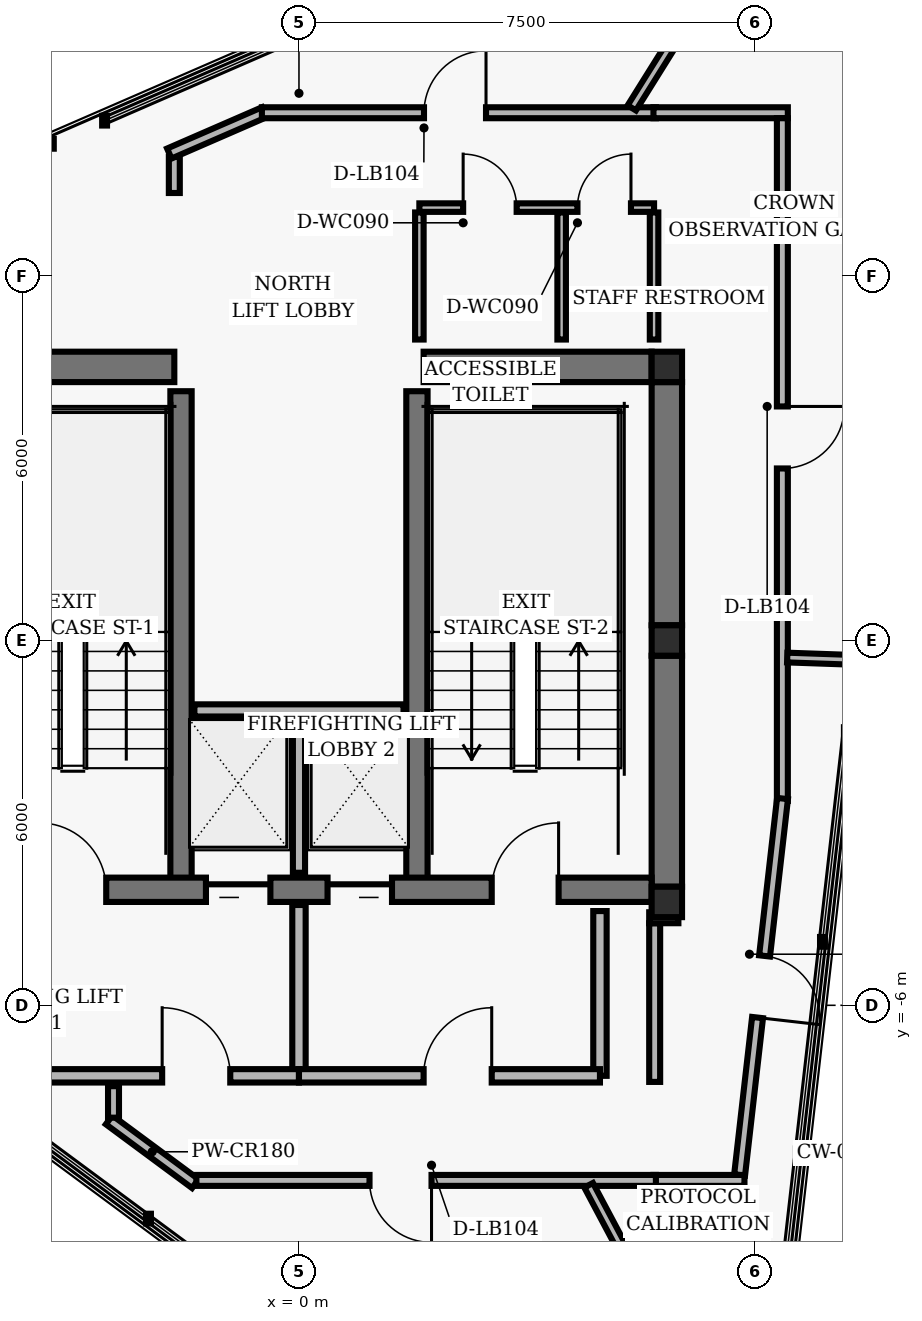
"""IFC4 building model, lengths in metres.
Left out: names, types, materials, properties, quantities, classifications, styles, units other than length and angle.
Written with IfcOpenShell. Run it as: python <this file> out.ifc"""

import sys

from ifc_helpers import new_model, si_unit, direction, frame, frame_2d, origin, origin_2d, place, context, subcontext, project, spatial, rectangle, hollow_rectangle, extrude, element, fill, save


model = new_model("IFC4")
c1 = context("Model", 3, precision=1e-05, world=origin(), true_north=direction((0.0, 1.0)))
c2 = subcontext(c1, "Body", "Model", "MODEL_VIEW")
j1 = project(units=[si_unit("LENGTHUNIT", "METRE"), si_unit("PLANEANGLEUNIT", "RADIAN")], contexts=[c1])
p1 = place(None, origin())
s1 = spatial("IfcSite", under=j1, at=p1, CompositionType="ELEMENT")
p2 = place(p1, origin())
s2 = spatial("IfcBuilding", under=s1, at=p2, CompositionType="ELEMENT")
p3 = place(p2, frame((0.0, 0.0, 252.0)))
s3 = spatial("IfcBuildingStorey", under=s2, at=p3, CompositionType="ELEMENT", Elevation=252.0)
for number, where, z_axis, x_axis in (
    (1, (6.05, 4.5, 0.0), (0.0, 0.0, 1.0), (1.0, 0.0, 0.0)),
    (2, (6.05, 0.0, 0.0), (0.0, 0.0, 1.0), (1.0, 0.0, 0.0)),
    (3, (6.05, -4.3, 0.0), (0.0, 0.0, 1.0), (1.0, 0.0, 0.0)),
):
    element("IfcColumn", number, at=place(p3, frame(where, z_axis=z_axis, x_axis=x_axis)), inside=s3, PredefinedType="COLUMN", context=c2, shape_type="SweptSolid", body=[
        extrude(hollow_rectangle(XDim=0.5, YDim=0.5, WallThickness=0.02, InnerFilletRadius=0.02, OuterFilletRadius=0.04, at=origin_2d()), origin(), (0.0, 0.0, 1.0), 2.88),
    ])
p4 = place(p3, frame((6.05, 0.25, 0.0), z_axis=(0.0, 0.0, 1.0), x_axis=(0.0, 1.0, 0.0)))
e4 = element("IfcWall", 4, at=p4, inside=s3, PredefinedType="SHEAR", context=c2, shape_type="SweptSolid", body=[
    extrude(rectangle(XDim=4.0, YDim=0.5, at=frame_2d((2.0, 0.0))), origin(), (0.0, 0.0, 1.0), 2.648),
])
p5 = place(p3, frame((6.05, -4.05, 0.0), z_axis=(0.0, 0.0, 1.0), x_axis=(0.0, 1.0, 0.0)))
e5 = element("IfcWall", 5, at=p5, inside=s3, PredefinedType="SHEAR", context=c2, shape_type="SweptSolid", body=[
    extrude(rectangle(XDim=3.8, YDim=0.5, at=frame_2d((1.9, 0.0))), origin(), (0.0, 0.0, 1.0), 2.648),
])
for number, where, z_axis, x_axis in (
    (6, (-1.94, -4.1, 0.0), (0.0, 0.0, 1.0), (0.0, 1.0, 0.0)),
    (7, (1.94, -4.1, 0.0), (0.0, 0.0, 1.0), (0.0, 1.0, 0.0)),
):
    element("IfcWall", number, at=place(p3, frame(where, z_axis=z_axis, x_axis=x_axis)), inside=s3, PredefinedType="SHEAR", context=c2, shape_type="SweptSolid", body=[
        extrude(rectangle(XDim=8.2, YDim=0.35, at=frame_2d((4.1, 0.0))), origin(), (0.0, 0.0, 1.0), 2.648),
    ])
p6 = place(p3, frame((-5.8, -4.1, 0.0), z_axis=(0.0, 0.0, 1.0), x_axis=(1.0, 0.0, 0.0)))
e8 = element("IfcWall", 8, at=p6, inside=s3, PredefinedType="SHEAR", context=c2, shape_type="SweptSolid", body=[
    extrude(rectangle(XDim=11.6, YDim=0.4, at=frame_2d((5.8, 0.0))), origin(), (0.0, 0.0, 1.0), 2.648),
])
p7 = place(p6, frame((1.53, 0.0, 0.0)))
e9 = element("IfcOpeningElement", 9, at=p7, cuts=e8, PredefinedType="OPENING", context=c2, shape_type="SweptSolid", body=[
    extrude(rectangle(XDim=1.1, YDim=2.04, at=frame_2d((0.55, 1.02))), frame((0.0, 0.21, 0.0), z_axis=(0.0, -1.0, 0.0), x_axis=(1.0, 0.0, 0.0)), (0.0, 0.0, 1.0), 0.42),
])
p8 = place(p6, frame((8.97, 0.0, 0.0)))
e10 = element("IfcOpeningElement", 10, at=p8, cuts=e8, PredefinedType="OPENING", context=c2, shape_type="SweptSolid", body=[
    extrude(rectangle(XDim=1.1, YDim=2.04, at=frame_2d((0.55, 1.02))), frame((0.0, 0.21, 0.0), z_axis=(0.0, -1.0, 0.0), x_axis=(1.0, 0.0, 0.0)), (0.0, 0.0, 1.0), 0.42),
])
p9 = place(p6, frame((4.27, 0.0, 0.0)))
e11 = element("IfcOpeningElement", 11, at=p9, cuts=e8, PredefinedType="OPENING", context=c2, shape_type="SweptSolid", body=[
    extrude(rectangle(XDim=1.06, YDim=2.04, at=frame_2d((0.53, 1.02))), frame((0.0, 0.21, 0.0), z_axis=(0.0, -1.0, 0.0), x_axis=(1.0, 0.0, 0.0)), (0.0, 0.0, 1.0), 0.42),
])
p10 = place(p6, frame((6.27, 0.0, 0.0)))
e12 = element("IfcOpeningElement", 12, at=p10, cuts=e8, PredefinedType="OPENING", context=c2, shape_type="SweptSolid", body=[
    extrude(rectangle(XDim=1.06, YDim=2.04, at=frame_2d((0.53, 1.02))), frame((0.0, 0.21, 0.0), z_axis=(0.0, -1.0, 0.0), x_axis=(1.0, 0.0, 0.0)), (0.0, 0.0, 1.0), 0.42),
])
for number, where, z_axis, x_axis in (
    (13, (-5.8, 4.5, 0.0), (0.0, 0.0, 1.0), (1.0, 0.0, 0.0)),
    (14, (2.05, 4.5, 0.0), (0.0, 0.0, 1.0), (1.0, 0.0, 0.0)),
):
    element("IfcWall", number, at=place(p3, frame(where, z_axis=z_axis, x_axis=x_axis)), inside=s3, PredefinedType="SHEAR", context=c2, shape_type="SweptSolid", body=[
        extrude(rectangle(XDim=3.75, YDim=0.5, at=frame_2d((1.875, 0.0))), origin(), (0.0, 0.0, 1.0), 2.648),
    ])
p11 = place(p3, frame((0.0, -3.82, 0.0), z_axis=(0.0, 0.0, 1.0), x_axis=(0.0, 1.0, 0.0)))
e15 = element("IfcWall", 15, at=p11, inside=s3, PredefinedType="PARTITIONING", context=c2, shape_type="SweptSolid", body=[
    extrude(rectangle(XDim=2.67, YDim=0.2, at=frame_2d((1.335, 0.0))), origin(), (0.0, 0.0, 1.0), 2.623),
])
p12 = place(p3, frame((-1.72, -1.15, 0.0), z_axis=(0.0, 0.0, 1.0), x_axis=(1.0, 0.0, 0.0)))
e16 = element("IfcWall", 16, at=p12, inside=s3, PredefinedType="PARTITIONING", context=c2, shape_type="SweptSolid", body=[
    extrude(rectangle(XDim=3.44, YDim=0.2, at=frame_2d((1.72, 0.0))), origin(), (0.0, 0.0, 1.0), 2.623),
])
p13 = place(p3, frame((4.95, -7.16, 0.0), z_axis=(0.0, 0.0, 1.0), x_axis=(0.0, 1.0, 0.0)))
e17 = element("IfcWall", 17, at=p13, inside=s3, PredefinedType="PARTITIONING", context=c2, shape_type="SweptSolid", body=[
    extrude(rectangle(XDim=2.71, YDim=0.22, at=frame_2d((1.355, 0.0))), origin(), (0.0, 0.0, 1.0), 2.623),
])
p14 = place(p3, frame((0.0, -7.16, 0.0), z_axis=(0.0, 0.0, 1.0), x_axis=(0.0, 1.0, 0.0)))
e18 = element("IfcWall", 18, at=p14, inside=s3, PredefinedType="PARTITIONING", context=c2, shape_type="SweptSolid", body=[
    extrude(rectangle(XDim=2.81, YDim=0.22, at=frame_2d((1.405, 0.0))), origin(), (0.0, 0.0, 1.0), 2.623),
])
p15 = place(p3, frame((-5.4, -7.16, 0.0), z_axis=(0.0, 0.0, 1.0), x_axis=(1.0, 0.0, 0.0)))
e19 = element("IfcWall", 19, at=p15, inside=s3, PredefinedType="PARTITIONING", context=c2, shape_type="SweptSolid", body=[
    extrude(rectangle(XDim=5.4, YDim=0.22, at=frame_2d((2.7, 0.0))), origin(), (0.0, 0.0, 1.0), 2.623),
])
p16 = place(p15, frame((3.15, 0.0, 0.0)))
e20 = element("IfcOpeningElement", 20, at=p16, cuts=e19, PredefinedType="OPENING", context=c2, shape_type="SweptSolid", body=[
    extrude(rectangle(XDim=1.12, YDim=2.02, at=frame_2d((0.56, 1.01))), frame((0.0, 0.12, 0.0), z_axis=(0.0, -1.0, 0.0), x_axis=(1.0, 0.0, 0.0)), (0.0, 0.0, 1.0), 0.24),
])
p17 = place(p3, frame((0.0, -7.16, 0.0), z_axis=(0.0, 0.0, 1.0), x_axis=(1.0, 0.0, 0.0)))
e21 = element("IfcWall", 21, at=p17, inside=s3, PredefinedType="PARTITIONING", context=c2, shape_type="SweptSolid", body=[
    extrude(rectangle(XDim=4.95, YDim=0.22, at=frame_2d((2.475, 0.0))), origin(), (0.0, 0.0, 1.0), 2.623),
])
p18 = place(p17, frame((2.05, 0.0, 0.0)))
e22 = element("IfcOpeningElement", 22, at=p18, cuts=e21, PredefinedType="OPENING", context=c2, shape_type="SweptSolid", body=[
    extrude(rectangle(XDim=1.12, YDim=2.02, at=frame_2d((0.56, 1.01))), frame((0.0, 0.12, 0.0), z_axis=(0.0, -1.0, 0.0), x_axis=(1.0, 0.0, 0.0)), (0.0, 0.0, 1.0), 0.24),
])
p19 = place(p3, frame((1.98, 4.95, 0.0), z_axis=(0.0, 0.0, 1.0), x_axis=(0.0, 1.0, 0.0)))
e23 = element("IfcWall", 23, at=p19, inside=s3, PredefinedType="PARTITIONING", context=c2, shape_type="SweptSolid", body=[
    extrude(rectangle(XDim=2.09, YDim=0.14, at=frame_2d((1.045, 0.0))), origin(), (0.0, 0.0, 1.0), 2.623),
])
p20 = place(p3, frame((5.84, 4.95, 0.0), z_axis=(0.0, 0.0, 1.0), x_axis=(0.0, 1.0, 0.0)))
e24 = element("IfcWall", 24, at=p20, inside=s3, PredefinedType="PARTITIONING", context=c2, shape_type="SweptSolid", body=[
    extrude(rectangle(XDim=2.09, YDim=0.14, at=frame_2d((1.045, 0.0))), origin(), (0.0, 0.0, 1.0), 2.153),
])
p21 = place(p3, frame((1.98, 7.12, 0.0), z_axis=(0.0, 0.0, 1.0), x_axis=(1.0, 0.0, 0.0)))
e25 = element("IfcWall", 25, at=p21, inside=s3, PredefinedType="PARTITIONING", context=c2, shape_type="SweptSolid", body=[
    extrude(rectangle(XDim=3.86, YDim=0.14, at=frame_2d((1.93, 0.0))), origin(), (0.0, 0.0, 1.0), 2.623),
])
p22 = place(p21, frame((0.72, 0.0, 0.0)))
e26 = element("IfcOpeningElement", 26, at=p22, cuts=e25, PredefinedType="OPENING", context=c2, shape_type="SweptSolid", body=[
    extrude(rectangle(XDim=0.88, YDim=2.02, at=frame_2d((0.44, 1.01))), frame((0.0, 0.08, 0.0), z_axis=(0.0, -1.0, 0.0), x_axis=(1.0, 0.0, 0.0)), (0.0, 0.0, 1.0), 0.16),
])
p23 = place(p21, frame((2.6, 0.0, 0.0)))
e27 = element("IfcOpeningElement", 27, at=p23, cuts=e25, PredefinedType="OPENING", context=c2, shape_type="SweptSolid", body=[
    extrude(rectangle(XDim=0.88, YDim=2.02, at=frame_2d((0.44, 1.01))), frame((0.0, 0.08, 0.0), z_axis=(0.0, -1.0, 0.0), x_axis=(1.0, 0.0, 0.0)), (0.0, 0.0, 1.0), 0.16),
])
p24 = place(p3, frame((4.32, 4.95, 0.0), z_axis=(0.0, 0.0, 1.0), x_axis=(0.0, 1.0, 0.0)))
e28 = element("IfcWall", 28, at=p24, inside=s3, PredefinedType="PARTITIONING", context=c2, shape_type="SweptSolid", body=[
    extrude(rectangle(XDim=2.09, YDim=0.14, at=frame_2d((1.045, 0.0))), origin(), (0.0, 0.0, 1.0), 2.623),
])
p25 = place(p3, frame((-1.705, -8.934, 0.0), z_axis=(0.0, 0.0, 1.0), x_axis=(-0.803804826616, 0.594893100236, 0.0)))
e29 = element("IfcWall", 29, at=p25, inside=s3, PredefinedType="PARTITIONING", context=c2, shape_type="SweptSolid", body=[
    extrude(rectangle(XDim=1.763, YDim=0.18, at=frame_2d((0.882, 0.0))), origin(), (0.0, 0.0, 1.0), 2.203),
])
p26 = place(p3, frame((-3.05, -7.848, 0.0), z_axis=(0.0, 0.0, 1.0), x_axis=(0.0, 1.0, 0.0)))
e30 = element("IfcWall", 30, at=p26, inside=s3, PredefinedType="PARTITIONING", context=c2, shape_type="SweptSolid", body=[
    extrude(rectangle(XDim=0.518, YDim=0.18, at=frame_2d((0.259, 0.0))), origin(), (0.0, 0.0, 1.0), 2.623),
])
p27 = place(p3, frame((5.85, -7.26, 0.0), z_axis=(0.0, 0.0, 1.0), x_axis=(0.0, 1.0, 0.0)))
e31 = element("IfcWall", 31, at=p27, inside=s3, PredefinedType="PARTITIONING", context=c2, shape_type="SweptSolid", body=[
    extrude(rectangle(XDim=2.61, YDim=0.18, at=frame_2d((1.305, 0.0))), origin(), (0.0, 0.0, 1.0), 2.153),
])
p28 = place(p3, frame((5.76, -4.56, 0.0), z_axis=(0.0, 0.0, 1.0), x_axis=(1.0, 0.0, 0.0)))
e32 = element("IfcWall", 32, at=p28, inside=s3, PredefinedType="PARTITIONING", context=c2, shape_type="SweptSolid", body=[
    extrude(rectangle(XDim=0.48, YDim=0.18, at=frame_2d((0.24, 0.0))), origin(), (0.0, 0.0, 1.0), 2.623),
])
p29 = place(p3, frame((-2.05, 7.36, 0.0), z_axis=(0.0, 0.0, 1.0), x_axis=(0.0, 1.0, 0.0)))
e33 = element("IfcWall", 33, at=p29, inside=s3, PredefinedType="PARTITIONING", context=c2, shape_type="SweptSolid", body=[
    extrude(rectangle(XDim=0.595, YDim=0.18, at=frame_2d((0.297, 0.0))), origin(), (0.0, 0.0, 1.0), 2.623),
])
p30 = place(p3, frame((-2.133, 8.009, 0.0), z_axis=(0.0, 0.0, 1.0), x_axis=(0.917070056253, 0.398726111414, 0.0)))
e34 = element("IfcWall", 34, at=p30, inside=s3, PredefinedType="PARTITIONING", context=c2, shape_type="SweptSolid", body=[
    extrude(rectangle(XDim=1.702, YDim=0.18, at=frame_2d((0.851, 0.0))), origin(), (0.0, 0.0, 1.0), 2.203),
])
p31 = place(p3, frame((-0.61, 8.68, 0.0), z_axis=(0.0, 0.0, 1.0), x_axis=(1.0, 0.0, 0.0)))
e35 = element("IfcWall", 35, at=p31, inside=s3, PredefinedType="PARTITIONING", context=c2, shape_type="SweptSolid", body=[
    extrude(rectangle(XDim=6.48, YDim=0.18, at=frame_2d((3.24, 0.0))), origin(), (0.0, 0.0, 1.0), 2.623),
])
p32 = place(p31, frame((2.666, 0.0, 0.0)))
e36 = element("IfcOpeningElement", 36, at=p32, cuts=e35, PredefinedType="OPENING", context=c2, shape_type="SweptSolid", body=[
    extrude(rectangle(XDim=1.02, YDim=2.02, at=frame_2d((0.51, 1.01))), frame((0.0, 0.1, 0.0), z_axis=(0.0, -1.0, 0.0), x_axis=(1.0, 0.0, 0.0)), (0.0, 0.0, 1.0), 0.2),
])
p33 = place(p3, frame((5.83, 8.68, 0.0), z_axis=(0.0, 0.0, 1.0), x_axis=(1.0, 0.0, 0.0)))
e37 = element("IfcWall", 37, at=p33, inside=s3, PredefinedType="PARTITIONING", context=c2, shape_type="SweptSolid", body=[
    extrude(rectangle(XDim=2.21, YDim=0.18, at=frame_2d((1.105, 0.0))), origin(), (0.0, 0.0, 1.0), 2.623),
])
p34 = place(p3, frame((7.95, 8.59, 0.0), z_axis=(0.0, 0.0, 1.0), x_axis=(0.0, -1.0, 0.0)))
e38 = element("IfcWall", 38, at=p34, inside=s3, PredefinedType="PARTITIONING", context=c2, shape_type="SweptSolid", body=[
    extrude(rectangle(XDim=1.41, YDim=0.18, at=frame_2d((0.705, 0.0))), origin(), (0.0, 0.0, 1.0), 2.623),
])
p35 = place(p3, frame((7.95, 7.22, 0.0), z_axis=(0.0, 0.0, 1.0), x_axis=(0.0, -1.0, 0.0)))
e39 = element("IfcWall", 39, at=p35, inside=s3, PredefinedType="PARTITIONING", context=c2, shape_type="SweptSolid", body=[
    extrude(rectangle(XDim=9.859, YDim=0.18, at=frame_2d((4.929, 0.0))), origin(), (0.0, 0.0, 1.0), 2.203),
])
p36 = place(p35, frame((3.371, 0.0, 0.0)))
e40 = element("IfcOpeningElement", 40, at=p36, cuts=e39, PredefinedType="OPENING", context=c2, shape_type="SweptSolid", body=[
    extrude(rectangle(XDim=1.02, YDim=2.02, at=frame_2d((0.51, 1.01))), frame((0.0, 0.1, 0.0), z_axis=(0.0, -1.0, 0.0), x_axis=(1.0, 0.0, 0.0)), (0.0, 0.0, 1.0), 0.2),
])
p37 = place(p3, frame((7.952, -2.599, 0.0), z_axis=(0.0, 0.0, 1.0), x_axis=(-0.113221740547, -0.993569744642, 0.0)))
e41 = element("IfcWall", 41, at=p37, inside=s3, PredefinedType="PARTITIONING", context=c2, shape_type="SweptSolid", body=[
    extrude(rectangle(XDim=6.232, YDim=0.18, at=frame_2d((3.116, 0.0))), origin(), (0.0, 0.0, 1.0), 2.203),
])
p38 = place(p37, frame((2.606, 0.0, 0.0)))
e42 = element("IfcOpeningElement", 42, at=p38, cuts=e41, PredefinedType="OPENING", context=c2, shape_type="SweptSolid", body=[
    extrude(rectangle(XDim=1.02, YDim=2.02, at=frame_2d((0.51, 1.01))), frame((0.0, 0.1, 0.0), z_axis=(0.0, -1.0, 0.0), x_axis=(1.0, 0.0, 0.0)), (0.0, 0.0, 1.0), 0.2),
])
p39 = place(p3, frame((7.327, -8.88, 0.0), z_axis=(0.0, 0.0, 1.0), x_axis=(-1.0, 0.0, 0.0)))
e43 = element("IfcWall", 43, at=p39, inside=s3, PredefinedType="PARTITIONING", context=c2, shape_type="SweptSolid", body=[
    extrude(rectangle(XDim=1.497, YDim=0.18, at=frame_2d((0.748, 0.0))), origin(), (0.0, 0.0, 1.0), 2.623),
])
p40 = place(p3, frame((5.87, -8.88, 0.0), z_axis=(0.0, 0.0, 1.0), x_axis=(-1.0, 0.0, 0.0)))
e44 = element("IfcWall", 44, at=p40, inside=s3, PredefinedType="PARTITIONING", context=c2, shape_type="SweptSolid", body=[
    extrude(rectangle(XDim=7.557, YDim=0.18, at=frame_2d((3.779, 0.0))), origin(), (0.0, 0.0, 1.0), 2.623),
])
p41 = place(p40, frame((3.69, 0.0, 0.0)))
e45 = element("IfcOpeningElement", 45, at=p41, cuts=e44, PredefinedType="OPENING", context=c2, shape_type="SweptSolid", body=[
    extrude(rectangle(XDim=1.02, YDim=2.02, at=frame_2d((0.51, 1.01))), frame((0.0, 0.1, 0.0), z_axis=(0.0, -1.0, 0.0), x_axis=(1.0, 0.0, 0.0)), (0.0, 0.0, 1.0), 0.2),
])
p42 = place(p3, frame((4.764, -8.96, 0.0), z_axis=(0.0, 0.0, 1.0), x_axis=(0.469463863752, -0.882951686465, 0.0)))
e46 = element("IfcWall", 46, at=p42, inside=s3, PredefinedType="PARTITIONING", context=c2, shape_type="SweptSolid", body=[
    extrude(rectangle(XDim=6.246, YDim=0.16, at=frame_2d((3.123, 0.0))), origin(), (0.0, 0.0, 1.0), 2.623),
])
p43 = place(p3, frame((8.03, -0.281, 0.0), z_axis=(0.0, 0.0, 1.0), x_axis=(0.999389795714, -0.034929016924, 0.0)))
e47 = element("IfcWall", 47, at=p43, inside=s3, PredefinedType="PARTITIONING", context=c2, shape_type="SweptSolid", body=[
    extrude(rectangle(XDim=1.279, YDim=0.16, at=frame_2d((0.64, 0.0))), origin(), (0.0, 0.0, 1.0), 2.623),
])
p44 = place(p3, frame((5.474, 8.76, 0.0), z_axis=(0.0, 0.0, 1.0), x_axis=(0.529930175969, 0.84804127765, 0.0)))
e48 = element("IfcWall", 48, at=p44, inside=s3, PredefinedType="PARTITIONING", context=c2, shape_type="SweptSolid", body=[
    extrude(rectangle(XDim=6.064, YDim=0.16, at=frame_2d((3.032, 0.0))), origin(), (0.0, 0.0, 1.0), 2.623),
])
p45 = place(p7, origin())
e49 = element("IfcDoor", 49, at=p45, inside=s3, OperationType="SINGLE_SWING_LEFT", PredefinedType="DOOR", context=c2, shape_type="SweptSolid", body=[
    extrude(rectangle(XDim=1.1, YDim=2.04, at=frame_2d((0.55, 1.02))), frame((0.0, 0.025, 0.0), z_axis=(0.0, -1.0, 0.0), x_axis=(1.0, 0.0, 0.0)), (0.0, 0.0, 1.0), 0.05),
])
fill(e9, e49)
p46 = place(p8, origin())
e50 = element("IfcDoor", 50, at=p46, inside=s3, OperationType="SINGLE_SWING_RIGHT", PredefinedType="DOOR", context=c2, shape_type="SweptSolid", body=[
    extrude(rectangle(XDim=1.1, YDim=2.04, at=frame_2d((0.55, 1.02))), frame((0.0, 0.025, 0.0), z_axis=(0.0, -1.0, 0.0), x_axis=(1.0, 0.0, 0.0)), (0.0, 0.0, 1.0), 0.05),
])
fill(e10, e50)
p47 = place(p9, origin())
e51 = element("IfcDoor", 51, at=p47, inside=s3, OperationType="SLIDING_TO_LEFT", PredefinedType="DOOR", context=c2, shape_type="SweptSolid", body=[
    extrude(rectangle(XDim=1.06, YDim=2.04, at=frame_2d((0.53, 1.02))), frame((0.0, 0.025, 0.0), z_axis=(0.0, -1.0, 0.0), x_axis=(1.0, 0.0, 0.0)), (0.0, 0.0, 1.0), 0.05),
])
fill(e11, e51)
p48 = place(p10, origin())
e52 = element("IfcDoor", 52, at=p48, inside=s3, OperationType="SLIDING_TO_RIGHT", PredefinedType="DOOR", context=c2, shape_type="SweptSolid", body=[
    extrude(rectangle(XDim=1.06, YDim=2.04, at=frame_2d((0.53, 1.02))), frame((0.0, 0.025, 0.0), z_axis=(0.0, -1.0, 0.0), x_axis=(1.0, 0.0, 0.0)), (0.0, 0.0, 1.0), 0.05),
])
fill(e12, e52)
p49 = place(p16, origin())
e53 = element("IfcDoor", 53, at=p49, inside=s3, OperationType="SINGLE_SWING_LEFT", PredefinedType="DOOR", context=c2, shape_type="SweptSolid", body=[
    extrude(rectangle(XDim=1.12, YDim=2.02, at=frame_2d((0.56, 1.01))), frame((0.0, 0.025, 0.0), z_axis=(0.0, -1.0, 0.0), x_axis=(1.0, 0.0, 0.0)), (0.0, 0.0, 1.0), 0.05),
])
fill(e20, e53)
p50 = place(p18, origin())
e54 = element("IfcDoor", 54, at=p50, inside=s3, OperationType="SINGLE_SWING_RIGHT", PredefinedType="DOOR", context=c2, shape_type="SweptSolid", body=[
    extrude(rectangle(XDim=1.12, YDim=2.02, at=frame_2d((0.56, 1.01))), frame((0.0, 0.025, 0.0), z_axis=(0.0, -1.0, 0.0), x_axis=(1.0, 0.0, 0.0)), (0.0, 0.0, 1.0), 0.05),
])
fill(e22, e54)
p51 = place(p22, origin())
e55 = element("IfcDoor", 55, at=p51, inside=s3, OperationType="SINGLE_SWING_LEFT", PredefinedType="DOOR", context=c2, shape_type="SweptSolid", body=[
    extrude(rectangle(XDim=0.88, YDim=2.02, at=frame_2d((0.44, 1.01))), frame((0.0, 0.025, 0.0), z_axis=(0.0, -1.0, 0.0), x_axis=(1.0, 0.0, 0.0)), (0.0, 0.0, 1.0), 0.05),
])
fill(e26, e55)
p52 = place(p23, origin())
e56 = element("IfcDoor", 56, at=p52, inside=s3, OperationType="SINGLE_SWING_RIGHT", PredefinedType="DOOR", context=c2, shape_type="SweptSolid", body=[
    extrude(rectangle(XDim=0.88, YDim=2.02, at=frame_2d((0.44, 1.01))), frame((0.0, 0.025, 0.0), z_axis=(0.0, -1.0, 0.0), x_axis=(1.0, 0.0, 0.0)), (0.0, 0.0, 1.0), 0.05),
])
fill(e27, e56)
p53 = place(p41, origin())
e57 = element("IfcDoor", 57, at=p53, inside=s3, OperationType="SINGLE_SWING_LEFT", PredefinedType="DOOR", context=c2, shape_type="SweptSolid", body=[
    extrude(rectangle(XDim=1.02, YDim=2.02, at=frame_2d((0.51, 1.01))), frame((0.0, 0.025, 0.0), z_axis=(0.0, -1.0, 0.0), x_axis=(1.0, 0.0, 0.0)), (0.0, 0.0, 1.0), 0.05),
])
fill(e45, e57)
p54 = place(p38, origin())
e58 = element("IfcDoor", 58, at=p54, inside=s3, OperationType="SINGLE_SWING_RIGHT", PredefinedType="DOOR", context=c2, shape_type="SweptSolid", body=[
    extrude(rectangle(XDim=1.02, YDim=2.02, at=frame_2d((0.51, 1.01))), frame((0.0, 0.025, 0.0), z_axis=(0.0, -1.0, 0.0), x_axis=(1.0, 0.0, 0.0)), (0.0, 0.0, 1.0), 0.05),
])
fill(e42, e58)
p55 = place(p36, origin())
e59 = element("IfcDoor", 59, at=p55, inside=s3, OperationType="SINGLE_SWING_LEFT", PredefinedType="DOOR", context=c2, shape_type="SweptSolid", body=[
    extrude(rectangle(XDim=1.02, YDim=2.02, at=frame_2d((0.51, 1.01))), frame((0.0, 0.025, 0.0), z_axis=(0.0, -1.0, 0.0), x_axis=(1.0, 0.0, 0.0)), (0.0, 0.0, 1.0), 0.05),
])
fill(e40, e59)
p56 = place(p32, origin())
e60 = element("IfcDoor", 60, at=p56, inside=s3, OperationType="SINGLE_SWING_RIGHT", PredefinedType="DOOR", context=c2, shape_type="SweptSolid", body=[
    extrude(rectangle(XDim=1.02, YDim=2.02, at=frame_2d((0.51, 1.01))), frame((0.0, 0.025, 0.0), z_axis=(0.0, -1.0, 0.0), x_axis=(1.0, 0.0, 0.0)), (0.0, 0.0, 1.0), 0.05),
])
fill(e36, e60)
save(model, sys.argv[1])
